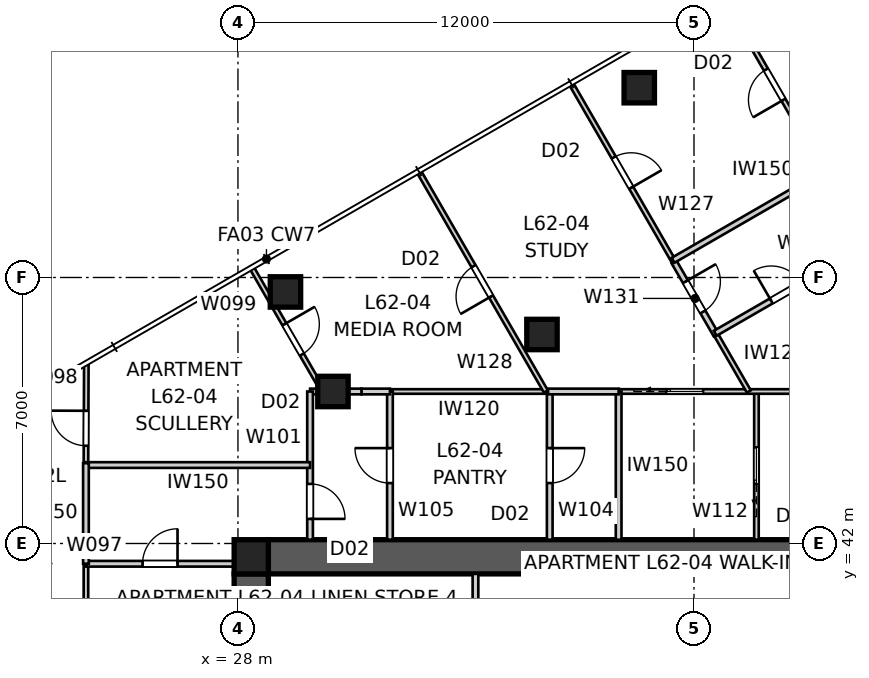
"""IFC4 building model, lengths in metres.
Left out: names, types, materials, properties, quantities, classifications, styles, units other than length and angle.
Written with IfcOpenShell. Run it as: python <this file> out.ifc"""

import sys

from ifc_helpers import new_model, si_unit, direction, frame, frame_2d, origin, origin_2d, place, context, subcontext, project, spatial, polyline, rectangle, outline, extrude, element, fill, save


model = new_model("IFC4")
c1 = context("Model", 3, precision=1e-05, world=origin(), true_north=direction((0.0, 1.0)))
c2 = subcontext(c1, "Body", "Model", "MODEL_VIEW")
j1 = project(units=[si_unit("LENGTHUNIT", "METRE"), si_unit("PLANEANGLEUNIT", "RADIAN")], contexts=[c1])
p1 = place(None, origin())
s1 = spatial("IfcSite", under=j1, at=p1, CompositionType="ELEMENT")
p2 = place(p1, origin())
s2 = spatial("IfcBuilding", under=s1, at=p2, CompositionType="ELEMENT")
p3 = place(p2, frame((0.0, 0.0, 225.2)))
s3 = spatial("IfcBuildingStorey", under=s2, at=p3, CompositionType="ELEMENT", Elevation=225.2)
p4 = place(p3, frame((28.8, 41.65, 0.0), z_axis=(0.0, 0.0, 1.0), x_axis=(1.0, 0.0, 0.0)))
e1 = element("IfcWall", 1, at=p4, inside=s3, PredefinedType="SHEAR", context=c2, shape_type="SweptSolid", body=[
    extrude(outline(polyline([(0.0, -0.45), (22.4, -0.45), (22.4, -0.025), (22.85, -0.025), (22.85, 0.025), (22.4, 0.025), (22.4, 0.45), (0.0, 0.45), (0.0, 0.025), (-0.45, 0.025), (-0.45, -0.025), (0.0, -0.025), (0.0, -0.45)])), origin(), (0.0, 0.0, 1.0), 3.4),
])
p5 = place(p3, frame((28.35, 41.2, 0.0), z_axis=(0.0, 0.0, 1.0), x_axis=(0.0, -1.0, 0.0)))
e2 = element("IfcWall", 2, at=p5, inside=s3, PredefinedType="SHEAR", context=c2, shape_type="SweptSolid", body=[
    extrude(outline(polyline([(0.0, -0.45), (22.4, -0.45), (22.4, -0.025), (22.85, -0.025), (22.85, 0.025), (22.4, 0.025), (22.4, 0.45), (0.0, 0.45), (0.0, 0.025), (-0.45, 0.025), (-0.45, -0.025), (0.0, -0.025), (0.0, -0.45)])), origin(), (0.0, 0.0, 1.0), 3.4),
])
p6 = place(p5, frame((11.14, 0.0, 0.0)))
e3 = element("IfcOpeningElement", 3, at=p6, cuts=e2, PredefinedType="OPENING", context=c2, shape_type="SweptSolid", body=[
    extrude(rectangle(XDim=1.02, YDim=2.4, at=frame_2d((0.51, 1.2))), frame((0.0, 0.46, 0.0), z_axis=(0.0, -1.0, 0.0), x_axis=(1.0, 0.0, 0.0)), (0.0, 0.0, 1.0), 0.92),
])
p7 = place(p3, frame((28.35, 41.65, 0.0), z_axis=(0.0, 0.0, 1.0), x_axis=(1.0, 0.0, 0.0)))
e4 = element("IfcColumn", 4, at=p7, inside=s3, PredefinedType="COLUMN", context=c2, shape_type="SweptSolid", body=[
    extrude(rectangle(XDim=0.9, YDim=0.9, at=origin_2d()), origin(), (0.0, 0.0, 1.0), 3.4),
])
for number, where, z_axis, x_axis in (
    (5, (38.56, 53.995, 0.0), (0.0, 0.0, 1.0), (1.0, 0.0, 0.0)),
    (6, (29.25, 48.62, 0.0), (0.0, 0.0, 1.0), (1.0, 0.0, 0.0)),
    (7, (36.0, 47.5, 0.0), (0.0, 0.0, 1.0), (1.0, 0.0, 0.0)),
    (8, (30.5, 46.0, 0.0), (0.0, 0.0, 1.0), (1.0, 0.0, 0.0)),
):
    element("IfcColumn", number, at=place(p3, frame(where, z_axis=z_axis, x_axis=x_axis)), inside=s3, PredefinedType="COLUMN", context=c2, shape_type="SweptSolid", body=[
        extrude(rectangle(XDim=0.8, YDim=0.8, at=origin_2d()), origin(), (0.0, 0.0, 1.0), 3.4),
    ])
p8 = place(p3, frame((34.25, 41.2, 0.0), z_axis=(0.0, 0.0, 1.0), x_axis=(0.0, -1.0, 0.0)))
e9 = element("IfcWall", 9, at=p8, inside=s3, PredefinedType="SOLIDWALL", context=c2, shape_type="SweptSolid", body=[
    extrude(rectangle(XDim=5.95, YDim=0.15, at=frame_2d((2.975, 0.0))), origin(), (0.0, 0.0, 1.0), 3.25),
])
p9 = place(p8, frame((2.515, 0.0, 0.0)))
e10 = element("IfcOpeningElement", 10, at=p9, cuts=e9, PredefinedType="OPENING", context=c2, shape_type="SweptSolid", body=[
    extrude(rectangle(XDim=0.92, YDim=2.1, at=frame_2d((0.46, 1.05))), frame((0.0, 0.085, 0.0), z_axis=(0.0, -1.0, 0.0), x_axis=(1.0, 0.0, 0.0)), (0.0, 0.0, 1.0), 0.17),
])
p10 = place(p3, frame((24.0, 31.443, 0.0), z_axis=(0.0, 0.0, 1.0), x_axis=(0.0, 1.0, 0.0)))
e11 = element("IfcWall", 11, at=p10, inside=s3, PredefinedType="PARTITIONING", context=c2, shape_type="SweptSolid", body=[
    extrude(rectangle(XDim=10.023, YDim=0.12, at=frame_2d((5.012, 0.0))), origin(), (0.0, 0.0, 1.0), 2.55),
])
p11 = place(p10, frame((4.552, 0.0, 0.0)))
e12 = element("IfcOpeningElement", 12, at=p11, cuts=e11, PredefinedType="OPENING", context=c2, shape_type="SweptSolid", body=[
    extrude(rectangle(XDim=0.92, YDim=2.34, at=frame_2d((0.46, 1.17))), frame((0.0, 0.07, 0.0), z_axis=(0.0, -1.0, 0.0), x_axis=(1.0, 0.0, 0.0)), (0.0, 0.0, 1.0), 0.14),
])
p12 = place(p3, frame((24.0, 41.467, 0.0), z_axis=(0.0, 0.0, 1.0), x_axis=(1.0, 0.0, 0.0)))
e13 = element("IfcWall", 13, at=p12, inside=s3, PredefinedType="SOLIDWALL", context=c2, shape_type="SweptSolid", body=[
    extrude(rectangle(XDim=4.82, YDim=0.15, at=frame_2d((2.41, 0.0))), origin(), (0.0, 0.0, 1.0), 3.25),
])
p13 = place(p12, frame((1.49, 0.0, 0.0)))
e14 = element("IfcOpeningElement", 14, at=p13, cuts=e13, PredefinedType="OPENING", context=c2, shape_type="SweptSolid", body=[
    extrude(rectangle(XDim=0.92, YDim=2.1, at=frame_2d((0.46, 1.05))), frame((0.0, 0.085, 0.0), z_axis=(0.0, -1.0, 0.0), x_axis=(1.0, 0.0, 0.0)), (0.0, 0.0, 1.0), 0.17),
])
p14 = place(p3, frame((24.0, 44.115, 0.0), z_axis=(0.0, 0.0, 1.0), x_axis=(0.003773202081, 0.999992881448, 0.0)))
e15 = element("IfcWall", 15, at=p14, inside=s3, PredefinedType="PARTITIONING", context=c2, shape_type="SweptSolid", body=[
    extrude(rectangle(XDim=2.588, YDim=0.12, at=frame_2d((1.294, 0.0))), origin(), (0.0, 0.0, 1.0), 3.25),
])
p15 = place(p14, frame((0.458, 0.0, 0.0)))
e16 = element("IfcOpeningElement", 16, at=p15, cuts=e15, PredefinedType="OPENING", context=c2, shape_type="SweptSolid", body=[
    extrude(rectangle(XDim=0.92, YDim=2.1, at=frame_2d((0.46, 1.05))), frame((0.0, 0.07, 0.0), z_axis=(0.0, -1.0, 0.0), x_axis=(1.0, 0.0, 0.0)), (0.0, 0.0, 1.0), 0.14),
])
p16 = place(p3, frame((28.38, 49.226, 0.0), z_axis=(0.0, 0.0, 1.0), x_axis=(0.499973989716, -0.866040420308, 0.0)))
e17 = element("IfcWall", 17, at=p16, inside=s3, PredefinedType="PARTITIONING", context=c2, shape_type="SweptSolid", body=[
    extrude(rectangle(XDim=3.725, YDim=0.12, at=frame_2d((1.862, 0.0))), origin(), (0.0, 0.0, 1.0), 3.25),
])
p17 = place(p16, frame((1.682, 0.0, 0.0)))
e18 = element("IfcOpeningElement", 18, at=p17, cuts=e17, PredefinedType="OPENING", context=c2, shape_type="SweptSolid", body=[
    extrude(rectangle(XDim=0.92, YDim=2.34, at=frame_2d((0.46, 1.17))), frame((0.0, 0.07, 0.0), z_axis=(0.0, -1.0, 0.0), x_axis=(1.0, 0.0, 0.0)), (0.0, 0.0, 1.0), 0.14),
])
p18 = place(p3, frame((30.633, 46.0, 0.0), z_axis=(0.0, 0.0, 1.0), x_axis=(-1.0, 0.0, 0.0)))
e19 = element("IfcWall", 19, at=p18, inside=s3, PredefinedType="SOLIDWALL", context=c2, shape_type="SweptSolid", body=[
    extrude(rectangle(XDim=0.735, YDim=0.15, at=frame_2d((0.368, 0.0))), origin(), (0.0, 0.0, 1.0), 3.25),
])
p19 = place(p3, frame((29.897, 46.0, 0.0), z_axis=(0.0, 0.0, 1.0), x_axis=(0.0, -1.0, 0.0)))
e20 = element("IfcWall", 20, at=p19, inside=s3, PredefinedType="SOLIDWALL", context=c2, shape_type="SweptSolid", body=[
    extrude(rectangle(XDim=3.9, YDim=0.15, at=frame_2d((1.95, 0.0))), origin(), (0.0, 0.0, 1.0), 3.25),
])
p20 = place(p19, frame((2.433, 0.0, 0.0)))
e21 = element("IfcOpeningElement", 21, at=p20, cuts=e20, PredefinedType="OPENING", context=c2, shape_type="SweptSolid", body=[
    extrude(rectangle(XDim=0.92, YDim=2.34, at=frame_2d((0.46, 1.17))), frame((0.0, 0.085, 0.0), z_axis=(0.0, -1.0, 0.0), x_axis=(1.0, 0.0, 0.0)), (0.0, 0.0, 1.0), 0.17),
])
p21 = place(p3, frame((29.897, 44.065, 0.0), z_axis=(0.0, 0.0, 1.0), x_axis=(-1.0, 0.0, 0.0)))
e22 = element("IfcWall", 22, at=p21, inside=s3, PredefinedType="SOLIDWALL", context=c2, shape_type="SweptSolid", body=[
    extrude(rectangle(XDim=5.897, YDim=0.15, at=frame_2d((2.949, 0.0))), origin(), (0.0, 0.0, 1.0), 3.25),
])
p22 = place(p3, frame((32.0, 46.0, 0.0), z_axis=(0.0, 0.0, 1.0), x_axis=(1.0, 0.0, 0.0)))
e23 = element("IfcWall", 23, at=p22, inside=s3, PredefinedType="PARTITIONING", context=c2, shape_type="SweptSolid", body=[
    extrude(rectangle(XDim=4.161, YDim=0.12, at=frame_2d((2.081, 0.0))), origin(), (0.0, 0.0, 1.0), 3.25),
])
p23 = place(p3, frame((36.204, 46.0, 0.0), z_axis=(0.0, 0.0, 1.0), x_axis=(0.0, -1.0, 0.0)))
e24 = element("IfcWall", 24, at=p23, inside=s3, PredefinedType="SOLIDWALL", context=c2, shape_type="SweptSolid", body=[
    extrude(rectangle(XDim=3.9, YDim=0.15, at=frame_2d((1.95, 0.0))), origin(), (0.0, 0.0, 1.0), 3.25),
])
p24 = place(p23, frame((1.49, 0.0, 0.0)))
e25 = element("IfcOpeningElement", 25, at=p24, cuts=e24, PredefinedType="OPENING", context=c2, shape_type="SweptSolid", body=[
    extrude(rectangle(XDim=0.92, YDim=2.34, at=frame_2d((0.46, 1.17))), frame((0.0, 0.085, 0.0), z_axis=(0.0, -1.0, 0.0), x_axis=(1.0, 0.0, 0.0)), (0.0, 0.0, 1.0), 0.17),
])
p25 = place(p3, frame((32.0, 42.1, 0.0), z_axis=(0.0, 0.0, 1.0), x_axis=(0.0, 1.0, 0.0)))
e26 = element("IfcWall", 26, at=p25, inside=s3, PredefinedType="SOLIDWALL", context=c2, shape_type="SweptSolid", body=[
    extrude(rectangle(XDim=3.9, YDim=0.15, at=frame_2d((1.95, 0.0))), origin(), (0.0, 0.0, 1.0), 3.25),
])
p26 = place(p25, frame((1.49, 0.0, 0.0)))
e27 = element("IfcOpeningElement", 27, at=p26, cuts=e26, PredefinedType="OPENING", context=c2, shape_type="SweptSolid", body=[
    extrude(rectangle(XDim=0.92, YDim=2.34, at=frame_2d((0.46, 1.17))), frame((0.0, 0.085, 0.0), z_axis=(0.0, -1.0, 0.0), x_axis=(1.0, 0.0, 0.0)), (0.0, 0.0, 1.0), 0.17),
])
p27 = place(p3, frame((41.644, 42.1, 0.0), z_axis=(0.0, 0.0, 1.0), x_axis=(0.0, 1.0, 0.0)))
e28 = element("IfcWall", 28, at=p27, inside=s3, PredefinedType="PARTITIONING", context=c2, shape_type="SweptSolid", body=[
    extrude(rectangle(XDim=3.9, YDim=0.12, at=frame_2d((1.95, 0.0))), origin(), (0.0, 0.0, 1.0), 3.25),
])
p28 = place(p27, frame((1.47, 0.0, 0.0)))
e29 = element("IfcOpeningElement", 29, at=p28, cuts=e28, PredefinedType="OPENING", context=c2, shape_type="SweptSolid", body=[
    extrude(rectangle(XDim=0.96, YDim=2.1, at=frame_2d((0.48, 1.05))), frame((0.0, 0.07, 0.0), z_axis=(0.0, -1.0, 0.0), x_axis=(1.0, 0.0, 0.0)), (0.0, 0.0, 1.0), 0.14),
])
p29 = place(p3, frame((38.017, 46.0, 0.0), z_axis=(0.0, 0.0, 1.0), x_axis=(1.0, 0.0, 0.0)))
e30 = element("IfcWall", 30, at=p29, inside=s3, PredefinedType="PARTITIONING", context=c2, shape_type="SweptSolid", body=[
    extrude(rectangle(XDim=11.196, YDim=0.12, at=frame_2d((5.598, 0.0))), origin(), (0.0, 0.0, 1.0), 3.25),
])
p30 = place(p29, frame((1.262, 0.0, 0.0)))
e31 = element("IfcOpeningElement", 31, at=p30, cuts=e30, PredefinedType="OPENING", context=c2, shape_type="SweptSolid", body=[
    extrude(rectangle(XDim=0.96, YDim=2.1, at=frame_2d((0.48, 1.05))), frame((0.0, 0.07, 0.0), z_axis=(0.0, -1.0, 0.0), x_axis=(1.0, 0.0, 0.0)), (0.0, 0.0, 1.0), 0.14),
])
p31 = place(p3, frame((38.017, 42.1, 0.0), z_axis=(0.0, 0.0, 1.0), x_axis=(0.0, 1.0, 0.0)))
e32 = element("IfcWall", 32, at=p31, inside=s3, PredefinedType="SOLIDWALL", context=c2, shape_type="SweptSolid", body=[
    extrude(rectangle(XDim=3.9, YDim=0.15, at=frame_2d((1.95, 0.0))), origin(), (0.0, 0.0, 1.0), 3.25),
])
p32 = place(p3, frame((23.457, 31.13, 0.0), z_axis=(0.0, 0.0, 1.0), x_axis=(-0.499999220117, 0.86602585405, 0.0)))
e33 = element("IfcWall", 33, at=p32, inside=s3, PredefinedType="PARTITIONING", context=c2, shape_type="SweptSolid", body=[
    extrude(rectangle(XDim=13.21, YDim=0.12, at=frame_2d((6.605, 0.0))), origin(), (0.0, 0.0, 1.0), 3.25),
])
p33 = place(p32, frame((6.478, 0.0, 0.0)))
e34 = element("IfcOpeningElement", 34, at=p33, cuts=e33, PredefinedType="OPENING", context=c2, shape_type="SweptSolid", body=[
    extrude(rectangle(XDim=0.92, YDim=2.34, at=frame_2d((0.46, 1.17))), frame((0.0, 0.07, 0.0), z_axis=(0.0, -1.0, 0.0), x_axis=(1.0, 0.0, 0.0)), (0.0, 0.0, 1.0), 0.14),
])
p34 = place(p32, frame((1.403, 0.0, 0.0)))
e35 = element("IfcOpeningElement", 35, at=p34, cuts=e33, PredefinedType="OPENING", context=c2, shape_type="SweptSolid", body=[
    extrude(rectangle(XDim=0.92, YDim=2.34, at=frame_2d((0.46, 1.17))), frame((0.0, 0.07, 0.0), z_axis=(0.0, -1.0, 0.0), x_axis=(1.0, 0.0, 0.0)), (0.0, 0.0, 1.0), 0.14),
])
p35 = place(p32, frame((10.79, 0.0, 0.0)))
e36 = element("IfcOpeningElement", 36, at=p35, cuts=e33, PredefinedType="OPENING", context=c2, shape_type="SweptSolid", body=[
    extrude(rectangle(XDim=0.92, YDim=2.34, at=frame_2d((0.46, 1.17))), frame((0.0, 0.07, 0.0), z_axis=(0.0, -1.0, 0.0), x_axis=(1.0, 0.0, 0.0)), (0.0, 0.0, 1.0), 0.14),
])
p36 = place(p3, frame((24.0, 44.115, 0.0), z_axis=(0.0, 0.0, 1.0), x_axis=(0.0, -1.0, 0.0)))
e37 = element("IfcWall", 37, at=p36, inside=s3, PredefinedType="SOLIDWALL", context=c2, shape_type="SweptSolid", body=[
    extrude(rectangle(XDim=2.648, YDim=0.15, at=frame_2d((1.324, 0.0))), origin(), (0.0, 0.0, 1.0), 3.25),
])
p37 = place(p3, frame((43.48, 51.722, 0.0), z_axis=(0.0, 0.0, 1.0), x_axis=(-0.499989180974, 0.866031650062, 0.0)))
e38 = element("IfcWall", 38, at=p37, inside=s3, PredefinedType="PARTITIONING", context=c2, shape_type="SweptSolid", body=[
    extrude(rectangle(XDim=5.388, YDim=0.12, at=frame_2d((2.694, 0.0))), origin(), (0.0, 0.0, 1.0), 3.25),
])
p38 = place(p37, frame((2.254, 0.0, 0.0)))
e39 = element("IfcOpeningElement", 39, at=p38, cuts=e38, PredefinedType="OPENING", context=c2, shape_type="SweptSolid", body=[
    extrude(rectangle(XDim=0.92, YDim=2.34, at=frame_2d((0.46, 1.17))), frame((0.0, 0.07, 0.0), z_axis=(0.0, -1.0, 0.0), x_axis=(1.0, 0.0, 0.0)), (0.0, 0.0, 1.0), 0.14),
])
p39 = place(p3, frame((36.781, 54.076, 0.0), z_axis=(0.0, 0.0, 1.0), x_axis=(0.499989180974, -0.866031650062, 0.0)))
e40 = element("IfcWall", 40, at=p39, inside=s3, PredefinedType="PARTITIONING", context=c2, shape_type="SweptSolid", body=[
    extrude(rectangle(XDim=5.388, YDim=0.12, at=frame_2d((2.694, 0.0))), origin(), (0.0, 0.0, 1.0), 3.25),
])
p40 = place(p39, frame((2.214, 0.0, 0.0)))
e41 = element("IfcOpeningElement", 41, at=p40, cuts=e40, PredefinedType="OPENING", context=c2, shape_type="SweptSolid", body=[
    extrude(rectangle(XDim=0.92, YDim=2.34, at=frame_2d((0.46, 1.17))), frame((0.0, 0.07, 0.0), z_axis=(0.0, -1.0, 0.0), x_axis=(1.0, 0.0, 0.0)), (0.0, 0.0, 1.0), 0.14),
])
p41 = place(p3, frame((36.103, 46.0, 0.0), z_axis=(0.0, 0.0, 1.0), x_axis=(-0.500013541994, 0.866017585169, 0.0)))
e42 = element("IfcWall", 42, at=p41, inside=s3, PredefinedType="PARTITIONING", context=c2, shape_type="SweptSolid", body=[
    extrude(rectangle(XDim=6.655, YDim=0.12, at=frame_2d((3.328, 0.0))), origin(), (0.0, 0.0, 1.0), 3.25),
])
p42 = place(p41, frame((2.887, 0.0, 0.0)))
e43 = element("IfcOpeningElement", 43, at=p42, cuts=e42, PredefinedType="OPENING", context=c2, shape_type="SweptSolid", body=[
    extrude(rectangle(XDim=0.92, YDim=2.34, at=frame_2d((0.46, 1.17))), frame((0.0, 0.07, 0.0), z_axis=(0.0, -1.0, 0.0), x_axis=(1.0, 0.0, 0.0)), (0.0, 0.0, 1.0), 0.14),
])
p43 = place(p3, frame((40.584, 47.488, 0.0), z_axis=(0.0, 0.0, 1.0), x_axis=(0.500005339912, -0.866022320763, 0.0)))
e44 = element("IfcWall", 44, at=p43, inside=s3, PredefinedType="PARTITIONING", context=c2, shape_type="SweptSolid", body=[
    extrude(rectangle(XDim=1.718, YDim=0.12, at=frame_2d((0.859, 0.0))), origin(), (0.0, 0.0, 1.0), 3.25),
])
p44 = place(p3, frame((38.017, 46.0, 0.0), z_axis=(0.0, 0.0, 1.0), x_axis=(-1.0, 0.0, 0.0)))
e45 = element("IfcWall", 45, at=p44, inside=s3, PredefinedType="SOLIDWALL", context=c2, shape_type="SweptSolid", body=[
    extrude(rectangle(XDim=1.857, YDim=0.15, at=frame_2d((0.928, 0.0))), origin(), (0.0, 0.0, 1.0), 3.25),
])
p45 = place(p3, frame((39.475, 49.41, 0.0), z_axis=(0.0, 0.0, 1.0), x_axis=(0.500008142102, -0.866020702889, 0.0)))
e46 = element("IfcWall", 46, at=p45, inside=s3, PredefinedType="SOLIDWALL", context=c2, shape_type="SweptSolid", body=[
    extrude(rectangle(XDim=2.219, YDim=0.15, at=frame_2d((1.11, 0.0))), origin(), (0.0, 0.0, 1.0), 3.25),
])
p46 = place(p45, frame((0.6, 0.0, 0.0)))
e47 = element("IfcOpeningElement", 47, at=p46, cuts=e46, PredefinedType="OPENING", context=c2, shape_type="SweptSolid", body=[
    extrude(rectangle(XDim=0.92, YDim=2.34, at=frame_2d((0.46, 1.17))), frame((0.0, 0.085, 0.0), z_axis=(0.0, -1.0, 0.0), x_axis=(1.0, 0.0, 0.0)), (0.0, 0.0, 1.0), 0.17),
])
p47 = place(p3, frame((43.455, 51.766, 0.0), z_axis=(0.0, 0.0, 1.0), x_axis=(-0.866025598446, -0.499999662836, 0.0)))
e48 = element("IfcWall", 48, at=p47, inside=s3, PredefinedType="SOLIDWALL", context=c2, shape_type="SweptSolid", body=[
    extrude(rectangle(XDim=4.625, YDim=0.15, at=frame_2d((2.312, 0.0))), origin(), (0.0, 0.0, 1.0), 3.25),
])
p48 = place(p3, frame((32.0, 46.0, 0.0), z_axis=(0.0, 0.0, 1.0), x_axis=(-1.0, 0.0, 0.0)))
e49 = element("IfcWall", 49, at=p48, inside=s3, PredefinedType="SOLIDWALL", context=c2, shape_type="SweptSolid", body=[
    extrude(rectangle(XDim=0.75, YDim=0.15, at=frame_2d((0.375, 0.0))), origin(), (0.0, 0.0, 1.0), 3.25),
])
p49 = place(p3, frame((31.25, 46.0, 0.0), z_axis=(0.0, 0.0, 1.0), x_axis=(-1.0, 0.0, 0.0)))
e50 = element("IfcWall", 50, at=p49, inside=s3, PredefinedType="SOLIDWALL", context=c2, shape_type="SweptSolid", body=[
    extrude(rectangle(XDim=0.545, YDim=0.15, at=frame_2d((0.273, 0.0))), origin(), (0.0, 0.0, 1.0), 2.55),
])
p50 = place(p3, frame((40.559, 47.531, 0.0), z_axis=(0.0, 0.0, 1.0), x_axis=(0.866025598446, 0.499999662836, 0.0)))
e51 = element("IfcWall", 51, at=p50, inside=s3, PredefinedType="SOLIDWALL", context=c2, shape_type="SweptSolid", body=[
    extrude(rectangle(XDim=4.625, YDim=0.15, at=frame_2d((2.312, 0.0))), origin(), (0.0, 0.0, 1.0), 3.25),
])
p51 = place(p50, frame((1.702, 0.0, 0.0)))
e52 = element("IfcOpeningElement", 52, at=p51, cuts=e51, PredefinedType="OPENING", context=c2, shape_type="SweptSolid", body=[
    extrude(rectangle(XDim=0.92, YDim=2.34, at=frame_2d((0.46, 1.17))), frame((0.0, 0.085, 0.0), z_axis=(0.0, -1.0, 0.0), x_axis=(1.0, 0.0, 0.0)), (0.0, 0.0, 1.0), 0.17),
])
p52 = place(p13, origin())
e53 = element("IfcDoor", 53, at=p52, inside=s3, OperationType="SINGLE_SWING_RIGHT", PredefinedType="DOOR", context=c2, shape_type="SweptSolid", body=[
    extrude(rectangle(XDim=0.92, YDim=2.1, at=frame_2d((0.46, 1.05))), frame((0.0, 0.025, 0.0), z_axis=(0.0, -1.0, 0.0), x_axis=(1.0, 0.0, 0.0)), (0.0, 0.0, 1.0), 0.05),
])
fill(e14, e53)
p53 = place(p15, origin())
e54 = element("IfcDoor", 54, at=p53, inside=s3, OperationType="SINGLE_SWING_RIGHT", PredefinedType="DOOR", context=c2, shape_type="SweptSolid", body=[
    extrude(rectangle(XDim=0.92, YDim=2.1, at=frame_2d((0.46, 1.05))), frame((0.0, 0.025, 0.0), z_axis=(0.0, -1.0, 0.0), x_axis=(1.0, 0.0, 0.0)), (0.0, 0.0, 1.0), 0.05),
])
fill(e16, e54)
p54 = place(p20, origin())
e55 = element("IfcDoor", 55, at=p54, inside=s3, OperationType="SINGLE_SWING_RIGHT", PredefinedType="DOOR", context=c2, shape_type="SweptSolid", body=[
    extrude(rectangle(XDim=0.92, YDim=2.34, at=frame_2d((0.46, 1.17))), frame((0.0, 0.025, 0.0), z_axis=(0.0, -1.0, 0.0), x_axis=(1.0, 0.0, 0.0)), (0.0, 0.0, 1.0), 0.05),
])
fill(e21, e55)
p55 = place(p17, origin())
e56 = element("IfcDoor", 56, at=p55, inside=s3, OperationType="SINGLE_SWING_LEFT", PredefinedType="DOOR", context=c2, shape_type="SweptSolid", body=[
    extrude(rectangle(XDim=0.92, YDim=2.34, at=frame_2d((0.46, 1.17))), frame((0.0, 0.025, 0.0), z_axis=(0.0, -1.0, 0.0), x_axis=(1.0, 0.0, 0.0)), (0.0, 0.0, 1.0), 0.05),
])
fill(e18, e56)
p56 = place(p26, origin())
e57 = element("IfcDoor", 57, at=p56, inside=s3, OperationType="SINGLE_SWING_RIGHT", PredefinedType="DOOR", context=c2, shape_type="SweptSolid", body=[
    extrude(rectangle(XDim=0.92, YDim=2.34, at=frame_2d((0.46, 1.17))), frame((0.0, 0.025, 0.0), z_axis=(0.0, -1.0, 0.0), x_axis=(1.0, 0.0, 0.0)), (0.0, 0.0, 1.0), 0.05),
])
fill(e27, e57)
p57 = place(p42, origin())
e58 = element("IfcDoor", 58, at=p57, inside=s3, OperationType="SINGLE_SWING_LEFT", PredefinedType="DOOR", context=c2, shape_type="SweptSolid", body=[
    extrude(rectangle(XDim=0.92, YDim=2.34, at=frame_2d((0.46, 1.17))), frame((0.0, 0.025, 0.0), z_axis=(0.0, -1.0, 0.0), x_axis=(1.0, 0.0, 0.0)), (0.0, 0.0, 1.0), 0.05),
])
fill(e43, e58)
p58 = place(p24, origin())
e59 = element("IfcDoor", 59, at=p58, inside=s3, OperationType="SINGLE_SWING_LEFT", PredefinedType="DOOR", context=c2, shape_type="SweptSolid", body=[
    extrude(rectangle(XDim=0.92, YDim=2.34, at=frame_2d((0.46, 1.17))), frame((0.0, 0.025, 0.0), z_axis=(0.0, -1.0, 0.0), x_axis=(1.0, 0.0, 0.0)), (0.0, 0.0, 1.0), 0.05),
])
fill(e25, e59)
p59 = place(p40, origin())
e60 = element("IfcDoor", 60, at=p59, inside=s3, OperationType="SINGLE_SWING_RIGHT", PredefinedType="DOOR", context=c2, shape_type="SweptSolid", body=[
    extrude(rectangle(XDim=0.92, YDim=2.34, at=frame_2d((0.46, 1.17))), frame((0.0, 0.025, 0.0), z_axis=(0.0, -1.0, 0.0), x_axis=(1.0, 0.0, 0.0)), (0.0, 0.0, 1.0), 0.05),
])
fill(e41, e60)
p60 = place(p30, origin())
e61 = element("IfcDoor", 61, at=p60, inside=s3, OperationType="SLIDING_TO_LEFT", PredefinedType="DOOR", context=c2, shape_type="SweptSolid", body=[
    extrude(rectangle(XDim=0.96, YDim=2.1, at=frame_2d((0.48, 1.05))), frame((0.0, 0.025, 0.0), z_axis=(0.0, -1.0, 0.0), x_axis=(1.0, 0.0, 0.0)), (0.0, 0.0, 1.0), 0.05),
])
fill(e31, e61)
p61 = place(p46, origin())
e62 = element("IfcDoor", 62, at=p61, inside=s3, OperationType="SINGLE_SWING_LEFT", PredefinedType="DOOR", context=c2, shape_type="SweptSolid", body=[
    extrude(rectangle(XDim=0.92, YDim=2.34, at=frame_2d((0.46, 1.17))), frame((0.0, 0.025, 0.0), z_axis=(0.0, -1.0, 0.0), x_axis=(1.0, 0.0, 0.0)), (0.0, 0.0, 1.0), 0.05),
])
fill(e47, e62)
p62 = place(p38, origin())
e63 = element("IfcDoor", 63, at=p62, inside=s3, OperationType="SINGLE_SWING_LEFT", PredefinedType="DOOR", context=c2, shape_type="SweptSolid", body=[
    extrude(rectangle(XDim=0.92, YDim=2.34, at=frame_2d((0.46, 1.17))), frame((0.0, 0.025, 0.0), z_axis=(0.0, -1.0, 0.0), x_axis=(1.0, 0.0, 0.0)), (0.0, 0.0, 1.0), 0.05),
])
fill(e39, e63)
p63 = place(p28, origin())
e64 = element("IfcDoor", 64, at=p63, inside=s3, OperationType="SLIDING_TO_LEFT", PredefinedType="DOOR", context=c2, shape_type="SweptSolid", body=[
    extrude(rectangle(XDim=0.96, YDim=2.1, at=frame_2d((0.48, 1.05))), frame((0.0, 0.025, 0.0), z_axis=(0.0, -1.0, 0.0), x_axis=(1.0, 0.0, 0.0)), (0.0, 0.0, 1.0), 0.05),
])
fill(e29, e64)
p64 = place(p51, origin())
e65 = element("IfcDoor", 65, at=p64, inside=s3, OperationType="SINGLE_SWING_LEFT", PredefinedType="DOOR", context=c2, shape_type="SweptSolid", body=[
    extrude(rectangle(XDim=0.92, YDim=2.34, at=frame_2d((0.46, 1.17))), frame((0.0, 0.025, 0.0), z_axis=(0.0, -1.0, 0.0), x_axis=(1.0, 0.0, 0.0)), (0.0, 0.0, 1.0), 0.05),
])
fill(e52, e65)
save(model, sys.argv[1])
